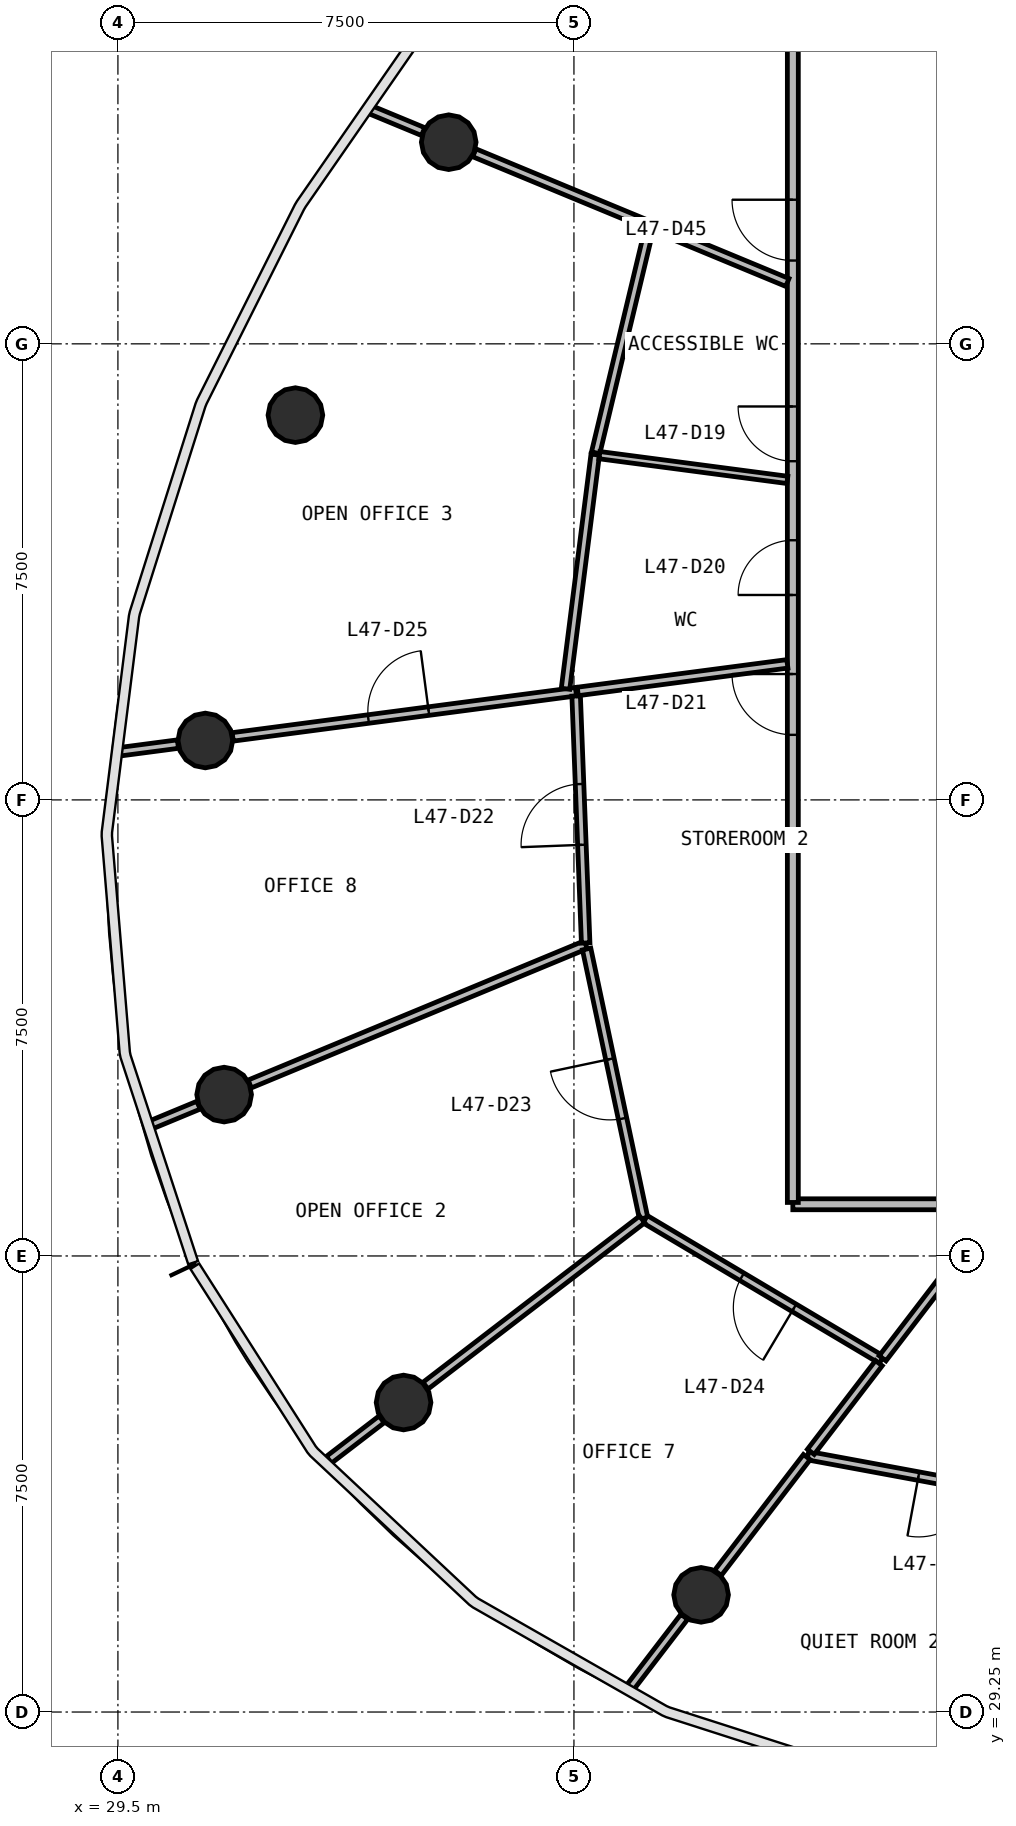
"""IFC4 building model, lengths in metres.
Left out: names, types, materials, properties, quantities, classifications, styles, units other than length and angle.
Written with IfcOpenShell. Run it as: python <this file> out.ifc"""

import sys

from ifc_helpers import new_model, si_unit, direction, frame, frame_2d, origin, origin_2d, place, context, subcontext, project, spatial, rectangle, circle, extrude, source, transform, mapped, element, fill, save


model = new_model("IFC4")
c1 = context("Model", 3, precision=1e-05, world=origin(), true_north=direction((0.0, 1.0)))
c2 = subcontext(c1, "Body", "Model", "MODEL_VIEW")
j1 = project(units=[si_unit("LENGTHUNIT", "METRE"), si_unit("PLANEANGLEUNIT", "RADIAN")], contexts=[c1])
p1 = place(None, origin())
s1 = spatial("IfcSite", under=j1, at=p1, CompositionType="ELEMENT")
p2 = place(p1, origin())
s2 = spatial("IfcBuilding", under=s1, at=p2, CompositionType="ELEMENT")
p3 = place(p2, frame((0.0, 0.0, 195.5)))
s3 = spatial("IfcBuildingStorey", under=s2, at=p3, CompositionType="ELEMENT", Elevation=195.5)
m1 = source(origin(), c2, "Body", "SweptSolid", [
    extrude(circle(Radius=0.45, at=origin_2d()), origin(), (0.0, 0.0, 1.0), 3.9),
])
for number, where, z_axis, x_axis in (
    (1, (34.941, 55.066, 0.0), (0.0, 0.0, 1.0), (1.0, 0.0, 0.0)),
    (2, (32.419, 50.578, 0.0), (0.0, 0.0, 1.0), (1.0, 0.0, 0.0)),
    (3, (30.938, 45.227, 0.0), (0.0, 0.0, 1.0), (1.0, 0.0, 0.0)),
    (4, (31.247, 39.404, 0.0), (0.0, 0.0, 1.0), (1.0, 0.0, 0.0)),
    (5, (34.198, 34.34, 0.0), (0.0, 0.0, 1.0), (1.0, 0.0, 0.0)),
    (6, (39.091, 31.177, 0.0), (0.0, 0.0, 1.0), (1.0, 0.0, 0.0)),
):
    element("IfcColumn", number, at=place(p3, frame(where, z_axis=z_axis, x_axis=x_axis)), inside=s3, PredefinedType="COLUMN", context=c2, shape_type="MappedRepresentation", body=[
        mapped(m1, transform((0.0, 0.0, 0.0), scale=1.0)),
    ])
p4 = place(p3, frame((63.4, 37.6, 0.0), z_axis=(0.0, 0.0, 1.0), x_axis=(-1.0, 0.0, 0.0)))
e7 = element("IfcWall", 7, at=p4, inside=s3, PredefinedType="PARTITIONING", context=c2, shape_type="SweptSolid", body=[
    extrude(rectangle(XDim=22.8, YDim=0.18, at=frame_2d((11.4, 0.0))), origin(), (0.0, 0.0, 1.0), 2.88),
])
p5 = place(p4, frame((12.95, 0.0, 0.0)))
e8 = element("IfcOpeningElement", 8, at=p5, cuts=e7, PredefinedType="OPENING", context=c2, shape_type="SweptSolid", body=[
    extrude(rectangle(XDim=1.0, YDim=2.1, at=frame_2d((0.5, 1.05))), frame((0.0, 0.1, 0.0), z_axis=(0.0, -1.0, 0.0), x_axis=(1.0, 0.0, 0.0)), (0.0, 0.0, 1.0), 0.2),
])
p6 = place(p4, frame((10.95, 0.0, 0.0)))
e9 = element("IfcOpeningElement", 9, at=p6, cuts=e7, PredefinedType="OPENING", context=c2, shape_type="SweptSolid", body=[
    extrude(rectangle(XDim=1.0, YDim=2.1, at=frame_2d((0.5, 1.05))), frame((0.0, 0.1, 0.0), z_axis=(0.0, -1.0, 0.0), x_axis=(1.0, 0.0, 0.0)), (0.0, 0.0, 1.0), 0.2),
])
p7 = place(p4, frame((8.75, 0.0, 0.0)))
e10 = element("IfcOpeningElement", 10, at=p7, cuts=e7, PredefinedType="OPENING", context=c2, shape_type="SweptSolid", body=[
    extrude(rectangle(XDim=1.0, YDim=2.1, at=frame_2d((0.5, 1.05))), frame((0.0, 0.1, 0.0), z_axis=(0.0, -1.0, 0.0), x_axis=(1.0, 0.0, 0.0)), (0.0, 0.0, 1.0), 0.2),
])
p8 = place(p3, frame((40.6, 37.63, 0.0), z_axis=(0.0, 0.0, 1.0), x_axis=(0.0, 1.0, 0.0)))
e11 = element("IfcWall", 11, at=p8, inside=s3, PredefinedType="PARTITIONING", context=c2, shape_type="SweptSolid", body=[
    extrude(rectangle(XDim=20.74, YDim=0.18, at=frame_2d((10.37, 0.0))), origin(), (0.0, 0.0, 1.0), 2.88),
])
p9 = place(p8, frame((12.19, 0.0, 0.0)))
e12 = element("IfcOpeningElement", 12, at=p9, cuts=e11, PredefinedType="OPENING", context=c2, shape_type="SweptSolid", body=[
    extrude(rectangle(XDim=0.9, YDim=2.1, at=frame_2d((0.45, 1.05))), frame((0.0, 0.1, 0.0), z_axis=(0.0, -1.0, 0.0), x_axis=(1.0, 0.0, 0.0)), (0.0, 0.0, 1.0), 0.2),
])
p10 = place(p8, frame((9.99, 0.0, 0.0)))
e13 = element("IfcOpeningElement", 13, at=p10, cuts=e11, PredefinedType="OPENING", context=c2, shape_type="SweptSolid", body=[
    extrude(rectangle(XDim=0.9, YDim=2.1, at=frame_2d((0.45, 1.05))), frame((0.0, 0.1, 0.0), z_axis=(0.0, -1.0, 0.0), x_axis=(1.0, 0.0, 0.0)), (0.0, 0.0, 1.0), 0.2),
])
p11 = place(p8, frame((7.69, 0.0, 0.0)))
e14 = element("IfcOpeningElement", 14, at=p11, cuts=e11, PredefinedType="OPENING", context=c2, shape_type="SweptSolid", body=[
    extrude(rectangle(XDim=1.0, YDim=2.1, at=frame_2d((0.5, 1.05))), frame((0.0, 0.1, 0.0), z_axis=(0.0, -1.0, 0.0), x_axis=(1.0, 0.0, 0.0)), (0.0, 0.0, 1.0), 0.2),
])
p12 = place(p8, frame((15.49, 0.0, 0.0)))
e15 = element("IfcOpeningElement", 15, at=p12, cuts=e11, PredefinedType="OPENING", context=c2, shape_type="SweptSolid", body=[
    extrude(rectangle(XDim=1.0, YDim=2.1, at=frame_2d((0.5, 1.05))), frame((0.0, 0.1, 0.0), z_axis=(0.0, -1.0, 0.0), x_axis=(1.0, 0.0, 0.0)), (0.0, 0.0, 1.0), 0.2),
])
p13 = place(p3, frame((37.194, 41.867, 0.0), z_axis=(0.0, 0.0, 1.0), x_axis=(-0.923879050947, -0.382684594961, 0.0)))
e16 = element("IfcWall", 16, at=p13, inside=s3, PredefinedType="PARTITIONING", context=c2, shape_type="SweptSolid", body=[
    extrude(rectangle(XDim=5.982, YDim=0.14, at=frame_2d((2.991, 0.0))), origin(), (0.0, 0.0, 1.0), 2.88),
])
p14 = place(p3, frame((31.388, 45.286, 0.0), z_axis=(0.0, 0.0, 1.0), x_axis=(0.991445974971, 0.130517733331, 0.0)))
e17 = element("IfcWall", 17, at=p14, inside=s3, PredefinedType="PARTITIONING", context=c2, shape_type="SweptSolid", body=[
    extrude(rectangle(XDim=5.694, YDim=0.14, at=frame_2d((2.847, 0.0))), origin(), (0.0, 0.0, 1.0), 2.88),
])
p15 = place(p14, frame((2.25, 0.0, 0.0)))
e18 = element("IfcOpeningElement", 18, at=p15, cuts=e17, PredefinedType="OPENING", context=c2, shape_type="SweptSolid", body=[
    extrude(rectangle(XDim=1.0, YDim=2.1, at=frame_2d((0.5, 1.05))), frame((0.0, 0.08, 0.0), z_axis=(0.0, -1.0, 0.0), x_axis=(1.0, 0.0, 0.0)), (0.0, 0.0, 1.0), 0.16),
])
p16 = place(p3, frame((40.51, 52.759, 0.0), z_axis=(0.0, 0.0, 1.0), x_axis=(-0.9238758778, 0.382692255499, 0.0)))
e19 = element("IfcWall", 19, at=p16, inside=s3, PredefinedType="PARTITIONING", context=c2, shape_type="SweptSolid", body=[
    extrude(rectangle(XDim=5.573, YDim=0.14, at=frame_2d((2.787, 0.0))), origin(), (0.0, 0.0, 1.0), 2.88),
])
p17 = place(p3, frame((45.615, 32.584, 0.0), z_axis=(0.0, 0.0, 1.0), x_axis=(-0.983287014194, 0.182062208375, 0.0)))
e20 = element("IfcWall", 20, at=p17, inside=s3, PredefinedType="PARTITIONING", context=c2, shape_type="SweptSolid", body=[
    extrude(rectangle(XDim=4.848, YDim=0.14, at=frame_2d((2.424, 0.0))), origin(), (0.0, 0.0, 1.0), 2.88),
])
p18 = place(p17, frame((1.997, 0.0, 0.0)))
e21 = element("IfcOpeningElement", 21, at=p18, cuts=e20, PredefinedType="OPENING", context=c2, shape_type="SweptSolid", body=[
    extrude(rectangle(XDim=1.0, YDim=2.1, at=frame_2d((0.5, 1.05))), frame((0.0, 0.08, 0.0), z_axis=(0.0, -1.0, 0.0), x_axis=(1.0, 0.0, 0.0)), (0.0, 0.0, 1.0), 0.16),
])
p19 = place(p3, frame((38.146, 37.369, 0.0), z_axis=(0.0, 0.0, 1.0), x_axis=(-0.207067802177, 0.978326594396, 0.0)))
e22 = element("IfcWall", 22, at=p19, inside=s3, PredefinedType="PARTITIONING", context=c2, shape_type="SweptSolid", body=[
    extrude(rectangle(XDim=4.526, YDim=0.14, at=frame_2d((2.263, 0.0))), origin(), (0.0, 0.0, 1.0), 2.88),
])
p20 = place(p19, frame((1.676, 0.0, 0.0)))
e23 = element("IfcOpeningElement", 23, at=p20, cuts=e22, PredefinedType="OPENING", context=c2, shape_type="SweptSolid", body=[
    extrude(rectangle(XDim=1.0, YDim=2.1, at=frame_2d((0.5, 1.05))), frame((0.0, 0.08, 0.0), z_axis=(0.0, -1.0, 0.0), x_axis=(1.0, 0.0, 0.0)), (0.0, 0.0, 1.0), 0.16),
])
p21 = place(p3, frame((42.058, 35.043, 0.0), z_axis=(0.0, 0.0, 1.0), x_axis=(-0.859530118144, 0.511085096635, 0.0)))
e24 = element("IfcWall", 24, at=p21, inside=s3, PredefinedType="PARTITIONING", context=c2, shape_type="SweptSolid", body=[
    extrude(rectangle(XDim=4.521, YDim=0.14, at=frame_2d((2.261, 0.0))), origin(), (0.0, 0.0, 1.0), 2.88),
])
p22 = place(p21, frame((1.671, 0.0, 0.0)))
e25 = element("IfcOpeningElement", 25, at=p22, cuts=e24, PredefinedType="OPENING", context=c2, shape_type="SweptSolid", body=[
    extrude(rectangle(XDim=1.0, YDim=2.1, at=frame_2d((0.5, 1.05))), frame((0.0, 0.08, 0.0), z_axis=(0.0, -1.0, 0.0), x_axis=(1.0, 0.0, 0.0)), (0.0, 0.0, 1.0), 0.16),
])
p23 = place(p3, frame((38.122, 37.351, 0.0), z_axis=(0.0, 0.0, 1.0), x_axis=(-0.793350839002, -0.608764688738, 0.0)))
e26 = element("IfcWall", 26, at=p23, inside=s3, PredefinedType="PARTITIONING", context=c2, shape_type="SweptSolid", body=[
    extrude(rectangle(XDim=4.492, YDim=0.14, at=frame_2d((2.246, 0.0))), origin(), (0.0, 0.0, 1.0), 2.88),
])
p24 = place(p3, frame((37.193, 41.897, 0.0), z_axis=(0.0, 0.0, 1.0), x_axis=(-0.038555360956, 0.999256465649, 0.0)))
e27 = element("IfcWall", 27, at=p24, inside=s3, PredefinedType="PARTITIONING", context=c2, shape_type="SweptSolid", body=[
    extrude(rectangle(XDim=4.065, YDim=0.14, at=frame_2d((2.033, 0.0))), origin(), (0.0, 0.0, 1.0), 2.88),
])
p25 = place(p24, frame((1.615, 0.0, 0.0)))
e28 = element("IfcOpeningElement", 28, at=p25, cuts=e27, PredefinedType="OPENING", context=c2, shape_type="SweptSolid", body=[
    extrude(rectangle(XDim=1.0, YDim=2.1, at=frame_2d((0.5, 1.05))), frame((0.0, 0.08, 0.0), z_axis=(0.0, -1.0, 0.0), x_axis=(1.0, 0.0, 0.0)), (0.0, 0.0, 1.0), 0.16),
])
p26 = place(p3, frame((37.35, 49.929, 0.0), z_axis=(0.0, 0.0, 1.0), x_axis=(-0.125845801859, -0.992049814351, 0.0)))
e29 = element("IfcWall", 29, at=p26, inside=s3, PredefinedType="PARTITIONING", context=c2, shape_type="SweptSolid", body=[
    extrude(rectangle(XDim=3.882, YDim=0.14, at=frame_2d((1.941, 0.0))), origin(), (0.0, 0.0, 1.0), 2.88),
])
p27 = place(p3, frame((38.235, 53.626, 0.0), z_axis=(0.0, 0.0, 1.0), x_axis=(-0.232775534837, -0.97253048815, 0.0)))
e30 = element("IfcWall", 30, at=p27, inside=s3, PredefinedType="PARTITIONING", context=c2, shape_type="SweptSolid", body=[
    extrude(rectangle(XDim=3.771, YDim=0.14, at=frame_2d((1.886, 0.0))), origin(), (0.0, 0.0, 1.0), 2.88),
])
p28 = place(p3, frame((40.51, 46.487, 0.0), z_axis=(0.0, 0.0, 1.0), x_axis=(-0.991441861772, -0.130548974432, 0.0)))
e31 = element("IfcWall", 31, at=p28, inside=s3, PredefinedType="PARTITIONING", context=c2, shape_type="SweptSolid", body=[
    extrude(rectangle(XDim=3.477, YDim=0.14, at=frame_2d((1.738, 0.0))), origin(), (0.0, 0.0, 1.0), 2.88),
])
p29 = place(p3, frame((43.951, 37.51, 0.0), z_axis=(0.0, 0.0, 1.0), x_axis=(-0.608729433535, -0.793377890256, 0.0)))
e32 = element("IfcWall", 32, at=p29, inside=s3, PredefinedType="PARTITIONING", context=c2, shape_type="SweptSolid", body=[
    extrude(rectangle(XDim=3.079, YDim=0.14, at=frame_2d((1.54, 0.0))), origin(), (0.0, 0.0, 1.0), 2.88),
])
p30 = place(p3, frame((40.83, 33.443, 0.0), z_axis=(0.0, 0.0, 1.0), x_axis=(-0.608796464689, -0.793326455239, 0.0)))
e33 = element("IfcWall", 33, at=p30, inside=s3, PredefinedType="PARTITIONING", context=c2, shape_type="SweptSolid", body=[
    extrude(rectangle(XDim=2.401, YDim=0.14, at=frame_2d((1.201, 0.0))), origin(), (0.0, 0.0, 1.0), 2.88),
])
p31 = place(p3, frame((42.015, 34.987, 0.0), z_axis=(0.0, 0.0, 1.0), x_axis=(-0.608760473936, -0.793354073144, 0.0)))
e34 = element("IfcWall", 34, at=p31, inside=s3, PredefinedType="PARTITIONING", context=c2, shape_type="SweptSolid", body=[
    extrude(rectangle(XDim=1.838, YDim=0.14, at=frame_2d((0.919, 0.0))), origin(), (0.0, 0.0, 1.0), 2.88),
])
p32 = place(p3, frame((38.814, 30.816, 0.0), z_axis=(0.0, 0.0, 1.0), x_axis=(-0.608738517345, -0.793370920504, 0.0)))
e35 = element("IfcWall", 35, at=p32, inside=s3, PredefinedType="PARTITIONING", context=c2, shape_type="SweptSolid", body=[
    extrude(rectangle(XDim=1.469, YDim=0.14, at=frame_2d((0.734, 0.0))), origin(), (0.0, 0.0, 1.0), 2.88),
])
p33 = place(p3, frame((33.837, 34.063, 0.0), z_axis=(0.0, 0.0, 1.0), x_axis=(-0.793412180781, -0.608684738915, 0.0)))
e36 = element("IfcWall", 36, at=p33, inside=s3, PredefinedType="PARTITIONING", context=c2, shape_type="SweptSolid", body=[
    extrude(rectangle(XDim=1.093, YDim=0.14, at=frame_2d((0.546, 0.0))), origin(), (0.0, 0.0, 1.0), 2.88),
])
p34 = place(p3, frame((30.487, 45.168, 0.0), z_axis=(0.0, 0.0, 1.0), x_axis=(-0.991439080575, -0.130570094237, 0.0)))
e37 = element("IfcWall", 37, at=p34, inside=s3, PredefinedType="PARTITIONING", context=c2, shape_type="SweptSolid", body=[
    extrude(rectangle(XDim=0.983, YDim=0.14, at=frame_2d((0.492, 0.0))), origin(), (0.0, 0.0, 1.0), 2.88),
])
p35 = place(p3, frame((34.52, 55.24, 0.0), z_axis=(0.0, 0.0, 1.0), x_axis=(-0.923934603914, 0.382550451171, 0.0)))
e38 = element("IfcWall", 38, at=p35, inside=s3, PredefinedType="PARTITIONING", context=c2, shape_type="SweptSolid", body=[
    extrude(rectangle(XDim=0.941, YDim=0.14, at=frame_2d((0.47, 0.0))), origin(), (0.0, 0.0, 1.0), 2.88),
])
p36 = place(p3, frame((30.826, 39.23, 0.0), z_axis=(0.0, 0.0, 1.0), x_axis=(-0.923828017367, -0.382807777256, 0.0)))
e39 = element("IfcWall", 39, at=p36, inside=s3, PredefinedType="PARTITIONING", context=c2, shape_type="SweptSolid", body=[
    extrude(rectangle(XDim=0.883, YDim=0.14, at=frame_2d((0.441, 0.0))), origin(), (0.0, 0.0, 1.0), 2.88),
])
p37 = place(p3, frame((40.51, 49.513, 0.0), z_axis=(0.0, 0.0, 1.0), x_axis=(-0.991440694955, 0.130557835413, 0.0)))
e40 = element("IfcWall", 40, at=p37, inside=s3, PredefinedType="PARTITIONING", context=c2, shape_type="SweptSolid", body=[
    extrude(rectangle(XDim=3.117, YDim=0.12, at=frame_2d((1.559, 0.0))), origin(), (0.0, 0.0, 1.0), 2.88),
])
m2 = source(origin(), c2, "Body", "SweptSolid", [
    extrude(rectangle(XDim=0.9, YDim=2.1, at=frame_2d((0.45, 1.05))), frame((0.0, 0.025, 0.0), z_axis=(0.0, -1.0, 0.0), x_axis=(1.0, 0.0, 0.0)), (0.0, 0.0, 1.0), 0.05),
])
p38 = place(p9, origin())
e41 = element("IfcDoor", 41, at=p38, inside=s3, OperationType="SINGLE_SWING_RIGHT", PredefinedType="DOOR", context=c2, shape_type="MappedRepresentation", body=[
    mapped(m2, transform((0.0, 0.0, 0.0), scale=1.0)),
])
fill(e12, e41)
p39 = place(p10, origin())
e42 = element("IfcDoor", 42, at=p39, inside=s3, OperationType="SINGLE_SWING_LEFT", PredefinedType="DOOR", context=c2, shape_type="MappedRepresentation", body=[
    mapped(m2, transform((0.0, 0.0, 0.0), scale=1.0)),
])
fill(e13, e42)
m3 = source(origin(), c2, "Body", "SweptSolid", [
    extrude(rectangle(XDim=1.0, YDim=2.1, at=frame_2d((0.5, 1.05))), frame((0.0, 0.025, 0.0), z_axis=(0.0, -1.0, 0.0), x_axis=(1.0, 0.0, 0.0)), (0.0, 0.0, 1.0), 0.05),
])
p40 = place(p11, origin())
e43 = element("IfcDoor", 43, at=p40, inside=s3, OperationType="SINGLE_SWING_RIGHT", PredefinedType="DOOR", context=c2, shape_type="MappedRepresentation", body=[
    mapped(m3, transform((0.0, 0.0, 0.0), scale=1.0)),
])
fill(e14, e43)
p41 = place(p25, origin())
e44 = element("IfcDoor", 44, at=p41, inside=s3, OperationType="SINGLE_SWING_LEFT", PredefinedType="DOOR", context=c2, shape_type="MappedRepresentation", body=[
    mapped(m3, transform((0.0, 0.0, 0.0), scale=1.0)),
])
fill(e28, e44)
p42 = place(p20, origin())
e45 = element("IfcDoor", 45, at=p42, inside=s3, OperationType="SINGLE_SWING_RIGHT", PredefinedType="DOOR", context=c2, shape_type="MappedRepresentation", body=[
    mapped(m3, transform((0.0, 0.0, 0.0), scale=1.0)),
])
fill(e23, e45)
p43 = place(p22, origin())
e46 = element("IfcDoor", 46, at=p43, inside=s3, OperationType="SINGLE_SWING_LEFT", PredefinedType="DOOR", context=c2, shape_type="MappedRepresentation", body=[
    mapped(m3, transform((0.0, 0.0, 0.0), scale=1.0)),
])
fill(e25, e46)
p44 = place(p15, origin())
e47 = element("IfcDoor", 47, at=p44, inside=s3, OperationType="SINGLE_SWING_RIGHT", PredefinedType="DOOR", context=c2, shape_type="MappedRepresentation", body=[
    mapped(m3, transform((0.0, 0.0, 0.0), scale=1.0)),
])
fill(e18, e47)
p45 = place(p18, origin())
e48 = element("IfcDoor", 48, at=p45, inside=s3, OperationType="SINGLE_SWING_RIGHT", PredefinedType="DOOR", context=c2, shape_type="MappedRepresentation", body=[
    mapped(m3, transform((0.0, 0.0, 0.0), scale=1.0)),
])
fill(e21, e48)
p46 = place(p12, origin())
e49 = element("IfcDoor", 49, at=p46, inside=s3, OperationType="SINGLE_SWING_RIGHT", PredefinedType="DOOR", context=c2, shape_type="MappedRepresentation", body=[
    mapped(m3, transform((0.0, 0.0, 0.0), scale=1.0)),
])
fill(e15, e49)
save(model, sys.argv[1])
